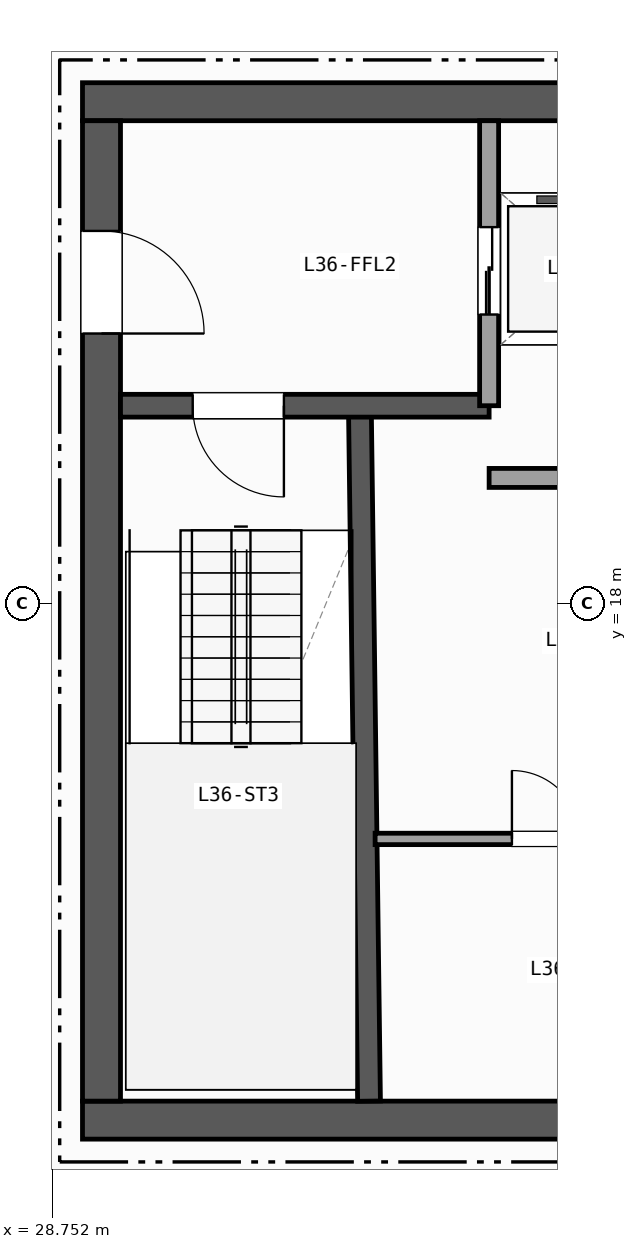
"""IFC4 building model, lengths in metres.
Left out: names, types, materials, properties, quantities, classifications, styles, units other than length and angle.
Written with IfcOpenShell. Run it as: python <this file> out.ifc"""

import sys

from ifc_helpers import new_model, si_unit, direction, frame, frame_2d, origin, place, context, subcontext, project, spatial, rectangle, extrude, element, fill, save


model = new_model("IFC4")
c1 = context("Model", 3, precision=1e-05, world=origin(), true_north=direction((0.0, 1.0)))
c2 = subcontext(c1, "Body", "Model", "MODEL_VIEW")
j1 = project(units=[si_unit("LENGTHUNIT", "METRE"), si_unit("PLANEANGLEUNIT", "RADIAN")], contexts=[c1])
p1 = place(None, origin())
s1 = spatial("IfcSite", under=j1, at=p1, CompositionType="ELEMENT")
p2 = place(p1, origin())
s2 = spatial("IfcBuilding", under=s1, at=p2, CompositionType="ELEMENT")
p3 = place(p2, frame((0.0, 0.0, 147.0)))
s3 = spatial("IfcBuildingStorey", under=s2, at=p3, CompositionType="ELEMENT", Elevation=147.0)
p4 = place(p3, frame((29.15, 11.2, 0.0), z_axis=(0.0, 0.0, 1.0), x_axis=(1.0, 0.0, 0.0)))
e1 = element("IfcWall", 1, at=p4, inside=s3, PredefinedType="SHEAR", context=c2, shape_type="SweptSolid", body=[
    extrude(rectangle(XDim=13.9, YDim=0.5, at=frame_2d((6.95, 0.0))), origin(), (0.0, 0.0, 1.0), 3.42),
])
p5 = place(p3, frame((43.05, 24.6, 0.0), z_axis=(0.0, 0.0, 1.0), x_axis=(-1.0, 0.0, 0.0)))
e2 = element("IfcWall", 2, at=p5, inside=s3, PredefinedType="SHEAR", context=c2, shape_type="SweptSolid", body=[
    extrude(rectangle(XDim=13.9, YDim=0.5, at=frame_2d((6.95, 0.0))), origin(), (0.0, 0.0, 1.0), 3.42),
])
p6 = place(p5, frame((0.75, 0.0, 0.0)))
e3 = element("IfcOpeningElement", 3, at=p6, cuts=e2, PredefinedType="OPENING", context=c2, shape_type="SweptSolid", body=[
    extrude(rectangle(XDim=1.1, YDim=2.15, at=frame_2d((0.55, 1.075))), frame((0.0, 0.26, 0.0), z_axis=(0.0, -1.0, 0.0), x_axis=(1.0, 0.0, 0.0)), (0.0, 0.0, 1.0), 0.52),
])
p7 = place(p5, frame((2.25, 0.0, 0.0)))
e4 = element("IfcOpeningElement", 4, at=p7, cuts=e2, PredefinedType="OPENING", context=c2, shape_type="SweptSolid", body=[
    extrude(rectangle(XDim=0.9, YDim=2.1, at=frame_2d((0.45, 1.05))), frame((0.0, 0.26, 0.0), z_axis=(0.0, -1.0, 0.0), x_axis=(1.0, 0.0, 0.0)), (0.0, 0.0, 1.0), 0.52),
])
p8 = place(p5, frame((3.55, 0.0, 0.0)))
e5 = element("IfcOpeningElement", 5, at=p8, cuts=e2, PredefinedType="OPENING", context=c2, shape_type="SweptSolid", body=[
    extrude(rectangle(XDim=0.9, YDim=2.1, at=frame_2d((0.45, 1.05))), frame((0.0, 0.26, 0.0), z_axis=(0.0, -1.0, 0.0), x_axis=(1.0, 0.0, 0.0)), (0.0, 0.0, 1.0), 0.52),
])
p9 = place(p5, frame((4.9, 0.0, 0.0)))
e6 = element("IfcOpeningElement", 6, at=p9, cuts=e2, PredefinedType="OPENING", context=c2, shape_type="SweptSolid", body=[
    extrude(rectangle(XDim=0.9, YDim=2.1, at=frame_2d((0.45, 1.05))), frame((0.0, 0.26, 0.0), z_axis=(0.0, -1.0, 0.0), x_axis=(1.0, 0.0, 0.0)), (0.0, 0.0, 1.0), 0.52),
])
p10 = place(p3, frame((29.4, 24.35, 0.0), z_axis=(0.0, 0.0, 1.0), x_axis=(0.0, -1.0, 0.0)))
e7 = element("IfcWall", 7, at=p10, inside=s3, PredefinedType="SHEAR", context=c2, shape_type="SweptSolid", body=[
    extrude(rectangle(XDim=12.9, YDim=0.5, at=frame_2d((6.45, 0.0))), origin(), (0.0, 0.0, 1.0), 3.42),
])
p11 = place(p10, frame((1.45, 0.0, 0.0)))
e8 = element("IfcOpeningElement", 8, at=p11, cuts=e7, PredefinedType="OPENING", context=c2, shape_type="SweptSolid", body=[
    extrude(rectangle(XDim=1.35, YDim=2.15, at=frame_2d((0.675, 1.075))), frame((0.0, 0.26, 0.0), z_axis=(0.0, -1.0, 0.0), x_axis=(1.0, 0.0, 0.0)), (0.0, 0.0, 1.0), 0.52),
])
p12 = place(p3, frame((32.92, 11.45, 0.0), z_axis=(0.0, 0.0, 1.0), x_axis=(-0.013171578211, 0.999913251001, 0.0)))
e9 = element("IfcWall", 9, at=p12, inside=s3, PredefinedType="SHEAR", context=c2, shape_type="SweptSolid", body=[
    extrude(rectangle(XDim=9.101, YDim=0.3, at=frame_2d((4.55, 0.0))), origin(), (0.0, 0.0, 1.0), 3.42),
])
p13 = place(p3, frame((34.5, 20.6, 0.0), z_axis=(0.0, 0.0, 1.0), x_axis=(-1.0, 0.0, 0.0)))
e10 = element("IfcWall", 10, at=p13, inside=s3, PredefinedType="SHEAR", context=c2, shape_type="SweptSolid", body=[
    extrude(rectangle(XDim=4.85, YDim=0.3, at=frame_2d((2.425, 0.0))), origin(), (0.0, 0.0, 1.0), 3.42),
])
p14 = place(p13, frame((2.7, 0.0, 0.0)))
e11 = element("IfcOpeningElement", 11, at=p14, cuts=e10, PredefinedType="OPENING", context=c2, shape_type="SweptSolid", body=[
    extrude(rectangle(XDim=1.2, YDim=2.15, at=frame_2d((0.6, 1.075))), frame((0.0, 0.16, 0.0), z_axis=(0.0, -1.0, 0.0), x_axis=(1.0, 0.0, 0.0)), (0.0, 0.0, 1.0), 0.32),
])
p15 = place(p3, frame((34.5, 20.6, 0.0), z_axis=(0.0, 0.0, 1.0), x_axis=(0.0, 1.0, 0.0)))
e12 = element("IfcWall", 12, at=p15, inside=s3, PredefinedType="PARTITIONING", context=c2, shape_type="SweptSolid", body=[
    extrude(rectangle(XDim=3.75, YDim=0.25, at=frame_2d((1.875, 0.0))), origin(), (0.0, 0.0, 1.0), 3.42),
])
p16 = place(p15, frame((1.2, 0.0, 0.0)))
e13 = element("IfcOpeningElement", 13, at=p16, cuts=e12, PredefinedType="OPENING", context=c2, shape_type="SweptSolid", body=[
    extrude(rectangle(XDim=1.15, YDim=2.15, at=frame_2d((0.575, 1.075))), frame((0.0, 0.135, 0.0), z_axis=(0.0, -1.0, 0.0), x_axis=(1.0, 0.0, 0.0)), (0.0, 0.0, 1.0), 0.27),
])
p17 = place(p3, frame((34.5, 19.65, 0.0), z_axis=(0.0, 0.0, 1.0), x_axis=(1.0, 0.0, 0.0)))
e14 = element("IfcWall", 14, at=p17, inside=s3, PredefinedType="PARTITIONING", context=c2, shape_type="SweptSolid", body=[
    extrude(rectangle(XDim=6.48, YDim=0.25, at=frame_2d((3.24, 0.0))), origin(), (0.0, 0.0, 1.0), 3.42),
])
p18 = place(p3, frame((33.0, 14.9, 0.0), z_axis=(0.0, 0.0, 1.0), x_axis=(1.0, 0.0, 0.0)))
e15 = element("IfcWall", 15, at=p18, inside=s3, PredefinedType="PARTITIONING", context=c2, shape_type="SweptSolid", body=[
    extrude(rectangle(XDim=5.1, YDim=0.15, at=frame_2d((2.55, 0.0))), origin(), (0.0, 0.0, 1.0), 3.42),
])
p19 = place(p18, frame((1.8, 0.0, 0.0)))
e16 = element("IfcOpeningElement", 16, at=p19, cuts=e15, PredefinedType="OPENING", context=c2, shape_type="SweptSolid", body=[
    extrude(rectangle(XDim=0.9, YDim=2.1, at=frame_2d((0.45, 1.05))), frame((0.0, 0.085, 0.0), z_axis=(0.0, -1.0, 0.0), x_axis=(1.0, 0.0, 0.0)), (0.0, 0.0, 1.0), 0.17),
])
p20 = place(p14, origin())
e17 = element("IfcDoor", 17, at=p20, inside=s3, OperationType="SINGLE_SWING_LEFT", PredefinedType="DOOR", context=c2, shape_type="SweptSolid", body=[
    extrude(rectangle(XDim=1.2, YDim=2.15, at=frame_2d((0.6, 1.075))), frame((0.0, 0.025, 0.0), z_axis=(0.0, -1.0, 0.0), x_axis=(1.0, 0.0, 0.0)), (0.0, 0.0, 1.0), 0.05),
])
fill(e11, e17)
p21 = place(p11, origin())
e18 = element("IfcDoor", 18, at=p21, inside=s3, OperationType="SINGLE_SWING_RIGHT", PredefinedType="DOOR", context=c2, shape_type="SweptSolid", body=[
    extrude(rectangle(XDim=1.35, YDim=2.15, at=frame_2d((0.675, 1.075))), frame((0.0, 0.025, 0.0), z_axis=(0.0, -1.0, 0.0), x_axis=(1.0, 0.0, 0.0)), (0.0, 0.0, 1.0), 0.05),
])
fill(e8, e18)
p22 = place(p16, origin())
e19 = element("IfcDoor", 19, at=p22, inside=s3, OperationType="DOUBLE_DOOR_SLIDING", PredefinedType="DOOR", context=c2, shape_type="SweptSolid", body=[
    extrude(rectangle(XDim=1.15, YDim=2.15, at=frame_2d((0.575, 1.075))), frame((0.0, 0.025, 0.0), z_axis=(0.0, -1.0, 0.0), x_axis=(1.0, 0.0, 0.0)), (0.0, 0.0, 1.0), 0.05),
])
fill(e13, e19)
p23 = place(p19, origin())
e20 = element("IfcDoor", 20, at=p23, inside=s3, OperationType="SINGLE_SWING_LEFT", PredefinedType="DOOR", context=c2, shape_type="SweptSolid", body=[
    extrude(rectangle(XDim=0.9, YDim=2.1, at=frame_2d((0.45, 1.05))), frame((0.0, 0.025, 0.0), z_axis=(0.0, -1.0, 0.0), x_axis=(1.0, 0.0, 0.0)), (0.0, 0.0, 1.0), 0.05),
])
fill(e16, e20)
save(model, sys.argv[1])
